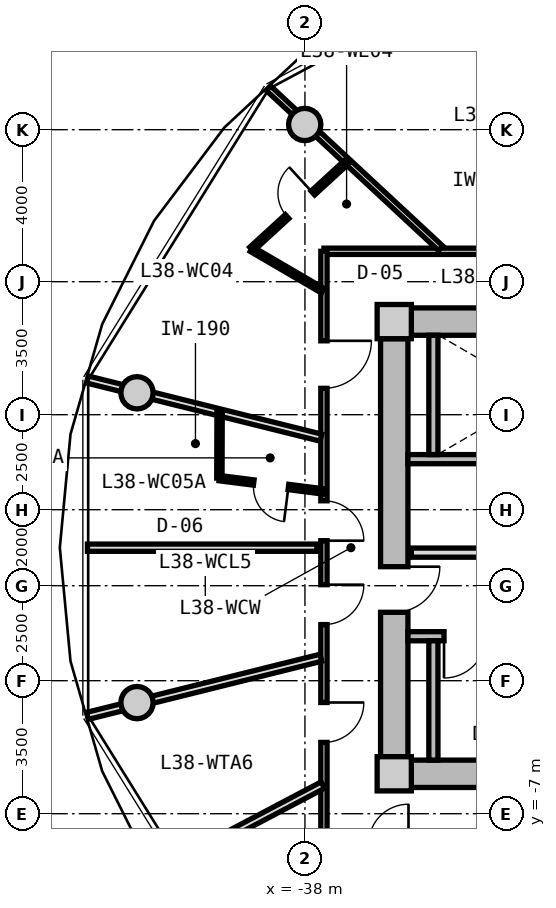
"""IFC4 building model, lengths in metres.
Left out: names, types, materials, properties, quantities, classifications, styles, units other than length and angle.
Written with IfcOpenShell. Run it as: python <this file> out.ifc"""

import sys

from ifc_helpers import new_model, si_unit, direction, frame, frame_2d, origin, origin_2d, place, context, subcontext, project, spatial, rectangle, circle, extrude, source, transform, mapped, element, fill, save


model = new_model("IFC4")
c1 = context("Model", 3, precision=1e-05, world=origin(), true_north=direction((0.0, 1.0)))
c2 = subcontext(c1, "Body", "Model", "MODEL_VIEW")
j1 = project(units=[si_unit("LENGTHUNIT", "METRE"), si_unit("PLANEANGLEUNIT", "RADIAN")], contexts=[c1])
p1 = place(None, origin())
s1 = spatial("IfcSite", under=j1, at=p1, CompositionType="ELEMENT")
p2 = place(p1, origin())
s2 = spatial("IfcBuilding", under=s1, at=p2, CompositionType="ELEMENT")
p3 = place(p2, frame((0.0, 0.0, 123.7)))
s3 = spatial("IfcBuildingStorey", under=s2, at=p3, CompositionType="ELEMENT", Elevation=123.7)
m1 = source(origin(), c2, "Body", "SweptSolid", [
    extrude(rectangle(XDim=0.9, YDim=0.9, at=origin_2d()), origin(), (0.0, 0.0, 1.0), 3.05),
])
for number, where, z_axis, x_axis in (
    (1, (-35.65, -5.95, 0.0), (0.0, 0.0, 1.0), (1.0, 0.0, 0.0)),
    (2, (-35.65, 5.95, 0.0), (0.0, 0.0, 1.0), (1.0, 0.0, 0.0)),
):
    element("IfcColumn", number, at=place(p3, frame(where, z_axis=z_axis, x_axis=x_axis)), inside=s3, PredefinedType="COLUMN", context=c2, shape_type="MappedRepresentation", body=[
        mapped(m1, transform((0.0, 0.0, 0.0), x_axis=(1.0, 0.0, 0.0), y_axis=(0.0, 1.0, 0.0), z_axis=(0.0, 0.0, 1.0), scale=1.0)),
    ])
m2 = source(origin(), c2, "Body", "SweptSolid", [
    extrude(rectangle(XDim=14.4, YDim=0.72, at=frame_2d((7.2, 0.0))), origin(), (0.0, 0.0, 1.0), 2.79),
])
for number, where, z_axis, x_axis in (
    (3, (-35.2, 5.95, 0.0), (0.0, 0.0, 1.0), (1.0, 0.0, 0.0)),
    (4, (-20.8, -5.95, 0.0), (0.0, 0.0, 1.0), (-1.0, 0.0, 0.0)),
):
    element("IfcWall", number, at=place(p3, frame(where, z_axis=z_axis, x_axis=x_axis)), inside=s3, PredefinedType="SHEAR", context=c2, shape_type="MappedRepresentation", body=[
        mapped(m2, transform((0.0, 0.0, 0.0), x_axis=(1.0, 0.0, 0.0), y_axis=(0.0, 1.0, 0.0), z_axis=(0.0, 0.0, 1.0), scale=1.0)),
    ])
m3 = source(origin(), c2, "Body", "SweptSolid", [
    extrude(rectangle(XDim=11.0, YDim=0.72, at=frame_2d((5.5, 0.0))), origin(), (0.0, 0.0, 1.0), 2.79),
])
p4 = place(p3, frame((-35.65, -5.5, 0.0), z_axis=(0.0, 0.0, 1.0), x_axis=(0.0, 1.0, 0.0)))
e5 = element("IfcWall", 5, at=p4, inside=s3, PredefinedType="SHEAR", context=c2, shape_type="MappedRepresentation", body=[
    mapped(m3, transform((0.0, 0.0, 0.0), x_axis=(1.0, 0.0, 0.0), y_axis=(0.0, 1.0, 0.0), z_axis=(0.0, 0.0, 1.0), scale=1.0)),
])
p5 = place(p4, frame((3.8, 0.0, 0.0)))
e6 = element("IfcOpeningElement", 6, at=p5, cuts=e5, PredefinedType="OPENING", context=c2, shape_type="SweptSolid", body=[
    extrude(rectangle(XDim=1.2, YDim=2.15, at=frame_2d((0.6, 1.075))), frame((0.0, 0.37, 0.0), z_axis=(0.0, -1.0, 0.0), x_axis=(1.0, 0.0, 0.0)), (0.0, 0.0, 1.0), 0.74),
])
m4 = source(origin(), c2, "Body", "SweptSolid", [
    extrude(circle(Radius=0.425, at=origin_2d()), origin(), (0.0, 0.0, 1.0), 3.05),
])
for number, where, z_axis, x_axis in (
    (7, (-38.006, 11.137, 0.0), (0.0, 0.0, 1.0), (1.0, 0.0, 0.0)),
    (8, (-42.419, 4.076, 0.0), (0.0, 0.0, 1.0), (1.0, 0.0, 0.0)),
    (9, (-42.419, -4.076, 0.0), (0.0, 0.0, 1.0), (1.0, 0.0, 0.0)),
):
    element("IfcColumn", number, at=place(p3, frame(where, z_axis=z_axis, x_axis=x_axis)), inside=s3, PredefinedType="COLUMN", context=c2, shape_type="MappedRepresentation", body=[
        mapped(m4, transform((0.0, 0.0, 0.0), x_axis=(1.0, 0.0, 0.0), y_axis=(0.0, 1.0, 0.0), z_axis=(0.0, 0.0, 1.0), scale=1.0)),
    ])
m5 = source(origin(), c2, "Body", "SweptSolid", [
    extrude(rectangle(XDim=7.83, YDim=0.24, at=frame_2d((3.915, 0.0))), origin(), (0.0, 0.0, 1.0), 2.79),
])
p6 = place(p3, frame((-35.29, 2.33, 0.0), z_axis=(0.0, 0.0, 1.0), x_axis=(1.0, 0.0, 0.0)))
e10 = element("IfcWall", 10, at=p6, inside=s3, PredefinedType="PARTITIONING", context=c2, shape_type="MappedRepresentation", body=[
    mapped(m5, transform((0.0, 0.0, 0.0), x_axis=(1.0, 0.0, 0.0), y_axis=(0.0, 1.0, 0.0), z_axis=(0.0, 0.0, 1.0), scale=1.0)),
])
m6 = source(origin(), c2, "Body", "SweptSolid", [
    extrude(rectangle(XDim=3.14, YDim=0.24, at=frame_2d((1.57, 0.0))), origin(), (0.0, 0.0, 1.0), 2.79),
])
p7 = place(p3, frame((-34.62, 2.45, 0.0), z_axis=(0.0, 0.0, 1.0), x_axis=(0.0, 1.0, 0.0)))
e11 = element("IfcWall", 11, at=p7, inside=s3, PredefinedType="PARTITIONING", context=c2, shape_type="MappedRepresentation", body=[
    mapped(m6, transform((0.0, 0.0, 0.0), x_axis=(1.0, 0.0, 0.0), y_axis=(0.0, 1.0, 0.0), z_axis=(0.0, 0.0, 1.0), scale=1.0)),
])
p8 = place(p3, frame((-35.29, -2.33, 0.0), z_axis=(0.0, 0.0, 1.0), x_axis=(1.0, 0.0, 0.0)))
e12 = element("IfcWall", 12, at=p8, inside=s3, PredefinedType="PARTITIONING", context=c2, shape_type="MappedRepresentation", body=[
    mapped(m5, transform((0.0, 0.0, 0.0), x_axis=(1.0, 0.0, 0.0), y_axis=(0.0, 1.0, 0.0), z_axis=(0.0, 0.0, 1.0), scale=1.0)),
])
p9 = place(p8, frame((0.95, 0.0, 0.0)))
e13 = element("IfcOpeningElement", 13, at=p9, cuts=e12, PredefinedType="OPENING", context=c2, shape_type="SweptSolid", body=[
    extrude(rectangle(XDim=1.1, YDim=2.15, at=frame_2d((0.55, 1.075))), frame((0.0, 0.13, 0.0), z_axis=(0.0, -1.0, 0.0), x_axis=(1.0, 0.0, 0.0)), (0.0, 0.0, 1.0), 0.26),
])
p10 = place(p3, frame((-34.62, -5.59, 0.0), z_axis=(0.0, 0.0, 1.0), x_axis=(0.0, 1.0, 0.0)))
e14 = element("IfcWall", 14, at=p10, inside=s3, PredefinedType="PARTITIONING", context=c2, shape_type="MappedRepresentation", body=[
    mapped(m6, transform((0.0, 0.0, 0.0), x_axis=(1.0, 0.0, 0.0), y_axis=(0.0, 1.0, 0.0), z_axis=(0.0, 0.0, 1.0), scale=1.0)),
])
m7 = source(origin(), c2, "Body", "SweptSolid", [
    extrude(rectangle(XDim=7.62, YDim=0.24, at=frame_2d((3.81, 0.0))), origin(), (0.0, 0.0, 1.0), 2.775),
])
p11 = place(p3, frame((-35.2, -0.13, 0.0), z_axis=(0.0, 0.0, 1.0), x_axis=(1.0, 0.0, 0.0)))
e15 = element("IfcWall", 15, at=p11, inside=s3, PredefinedType="PARTITIONING", context=c2, shape_type="MappedRepresentation", body=[
    mapped(m7, transform((0.0, 0.0, 0.0), x_axis=(1.0, 0.0, 0.0), y_axis=(0.0, 1.0, 0.0), z_axis=(0.0, 0.0, 1.0), scale=1.0)),
])
p12 = place(p11, frame((6.22, 0.0, 0.0)))
e16 = element("IfcOpeningElement", 16, at=p12, cuts=e15, PredefinedType="OPENING", context=c2, shape_type="SweptSolid", body=[
    extrude(rectangle(XDim=1.0, YDim=2.1, at=frame_2d((0.5, 1.05))), frame((0.0, 0.13, 0.0), z_axis=(0.0, -1.0, 0.0), x_axis=(1.0, 0.0, 0.0)), (0.0, 0.0, 1.0), 0.26),
])
p13 = place(p11, frame((2.4, 0.0, 0.0)))
e17 = element("IfcOpeningElement", 17, at=p13, cuts=e15, PredefinedType="OPENING", context=c2, shape_type="SweptSolid", body=[
    extrude(rectangle(XDim=1.0, YDim=2.1, at=frame_2d((0.5, 1.05))), frame((0.0, 0.13, 0.0), z_axis=(0.0, -1.0, 0.0), x_axis=(1.0, 0.0, 0.0)), (0.0, 0.0, 1.0), 0.26),
])
m8 = source(origin(), c2, "Body", "SweptSolid", [
    extrude(rectangle(XDim=8.6, YDim=0.165, at=frame_2d((4.3, 0.0))), origin(), (0.0, 0.0, 1.0), 2.775),
])
p14 = place(p3, frame((-37.5, 7.8, 0.0), z_axis=(0.0, 0.0, 1.0), x_axis=(1.0, 0.0, 0.0)))
e18 = element("IfcWall", 18, at=p14, inside=s3, PredefinedType="PARTITIONING", context=c2, shape_type="MappedRepresentation", body=[
    mapped(m8, transform((0.0, 0.0, 0.0), x_axis=(1.0, 0.0, 0.0), y_axis=(0.0, 1.0, 0.0), z_axis=(0.0, 0.0, 1.0), scale=1.0)),
])
m9 = source(origin(), c2, "Body", "SweptSolid", [
    extrude(rectangle(XDim=15.6, YDim=0.165, at=frame_2d((7.8, 0.0))), origin(), (0.0, 0.0, 1.0), 2.775),
])
p15 = place(p3, frame((-37.5, -7.8, 0.0), z_axis=(0.0, 0.0, 1.0), x_axis=(0.0, 1.0, 0.0)))
e19 = element("IfcWall", 19, at=p15, inside=s3, PredefinedType="PARTITIONING", context=c2, shape_type="MappedRepresentation", body=[
    mapped(m9, transform((0.0, 0.0, 0.0), x_axis=(1.0, 0.0, 0.0), y_axis=(0.0, 1.0, 0.0), z_axis=(0.0, 0.0, 1.0), scale=1.0)),
])
p16 = place(p15, frame((11.994, 0.0, 0.0)))
e20 = element("IfcOpeningElement", 20, at=p16, cuts=e19, PredefinedType="OPENING", context=c2, shape_type="SweptSolid", body=[
    extrude(rectangle(XDim=1.25, YDim=2.2, at=frame_2d((0.625, 1.1))), frame((0.0, 0.093, 0.0), z_axis=(0.0, -1.0, 0.0), x_axis=(1.0, 0.0, 0.0)), (0.0, 0.0, 1.0), 0.185),
])
p17 = place(p15, frame((7.984, 0.0, 0.0)))
e21 = element("IfcOpeningElement", 21, at=p17, cuts=e19, PredefinedType="OPENING", context=c2, shape_type="SweptSolid", body=[
    extrude(rectangle(XDim=1.05, YDim=2.15, at=frame_2d((0.525, 1.075))), frame((0.0, 0.093, 0.0), z_axis=(0.0, -1.0, 0.0), x_axis=(1.0, 0.0, 0.0)), (0.0, 0.0, 1.0), 0.185),
])
p18 = place(p15, frame((5.777, 0.0, 0.0)))
e22 = element("IfcOpeningElement", 22, at=p18, cuts=e19, PredefinedType="OPENING", context=c2, shape_type="SweptSolid", body=[
    extrude(rectangle(XDim=1.05, YDim=2.15, at=frame_2d((0.525, 1.075))), frame((0.0, 0.093, 0.0), z_axis=(0.0, -1.0, 0.0), x_axis=(1.0, 0.0, 0.0)), (0.0, 0.0, 1.0), 0.185),
])
p19 = place(p15, frame((2.676, 0.0, 0.0)))
e23 = element("IfcOpeningElement", 23, at=p19, cuts=e19, PredefinedType="OPENING", context=c2, shape_type="SweptSolid", body=[
    extrude(rectangle(XDim=1.05, YDim=2.15, at=frame_2d((0.525, 1.075))), frame((0.0, 0.093, 0.0), z_axis=(0.0, -1.0, 0.0), x_axis=(1.0, 0.0, 0.0)), (0.0, 0.0, 1.0), 0.185),
])
m10 = source(origin(), c2, "Body", "SweptSolid", [
    extrude(rectangle(XDim=6.187, YDim=0.165, at=frame_2d((3.093, 0.0))), origin(), (0.0, 0.0, 1.0), 2.275),
])
p20 = place(p3, frame((-34.429, 7.88, 0.0), z_axis=(0.0, 0.0, 1.0), x_axis=(-0.732501077882, 0.680765870841, 0.0)))
e24 = element("IfcWall", 24, at=p20, inside=s3, PredefinedType="PARTITIONING", context=c2, shape_type="MappedRepresentation", body=[
    mapped(m10, transform((0.0, 0.0, 0.0), x_axis=(1.0, 0.0, 0.0), y_axis=(0.0, 1.0, 0.0), z_axis=(0.0, 0.0, 1.0), scale=1.0)),
])
m11 = source(origin(), c2, "Body", "SweptSolid", [
    extrude(rectangle(XDim=6.331, YDim=0.19, at=frame_2d((3.165, 0.0))), origin(), (0.0, 0.0, 1.0), 2.275),
])
p21 = place(p3, frame((-37.58, 2.896, 0.0), z_axis=(0.0, 0.0, 1.0), x_axis=(-0.97036440661, 0.241646267062, 0.0)))
e25 = element("IfcWall", 25, at=p21, inside=s3, PredefinedType="PARTITIONING", context=c2, shape_type="MappedRepresentation", body=[
    mapped(m11, transform((0.0, 0.0, 0.0), x_axis=(1.0, 0.0, 0.0), y_axis=(0.0, 1.0, 0.0), z_axis=(0.0, 0.0, 1.0), scale=1.0)),
])
m12 = source(origin(), c2, "Body", "SweptSolid", [
    extrude(rectangle(XDim=2.172, YDim=0.14, at=frame_2d((1.086, 0.0))), origin(), (0.0, 0.0, 1.0), 2.775),
])
p22 = place(p3, frame((-37.53, 6.762, 0.0), z_axis=(0.0, 0.0, 1.0), x_axis=(-0.863562702562, 0.504241468688, 0.0)))
e26 = element("IfcWall", 26, at=p22, inside=s3, PredefinedType="PARTITIONING", context=c2, shape_type="MappedRepresentation", body=[
    mapped(m12, transform((0.0, 0.0, 0.0), x_axis=(1.0, 0.0, 0.0), y_axis=(0.0, 1.0, 0.0), z_axis=(0.0, 0.0, 1.0), scale=1.0)),
])
m13 = source(origin(), c2, "Body", "SweptSolid", [
    extrude(rectangle(XDim=3.457, YDim=0.14, at=frame_2d((1.729, 0.0))), origin(), (0.0, 0.0, 1.0), 2.775),
])
p23 = place(p3, frame((-39.405, 7.857, 0.0), z_axis=(0.0, 0.0, 1.0), x_axis=(0.737567375492, 0.675273549467, 0.0)))
e27 = element("IfcWall", 27, at=p23, inside=s3, PredefinedType="PARTITIONING", context=c2, shape_type="MappedRepresentation", body=[
    mapped(m13, transform((0.0, 0.0, 0.0), x_axis=(1.0, 0.0, 0.0), y_axis=(0.0, 1.0, 0.0), z_axis=(0.0, 0.0, 1.0), scale=1.0)),
])
p24 = place(p23, frame((1.268, 0.0, 0.0)))
e28 = element("IfcOpeningElement", 28, at=p24, cuts=e27, PredefinedType="OPENING", context=c2, shape_type="SweptSolid", body=[
    extrude(rectangle(XDim=0.92, YDim=2.1, at=frame_2d((0.46, 1.05))), frame((0.0, 0.08, 0.0), z_axis=(0.0, -1.0, 0.0), x_axis=(1.0, 0.0, 0.0)), (0.0, 0.0, 1.0), 0.16),
])
p25 = place(p3, frame((-37.58, -2.896, 0.0), z_axis=(0.0, 0.0, 1.0), x_axis=(-0.97036440661, -0.241646267062, 0.0)))
e29 = element("IfcWall", 29, at=p25, inside=s3, PredefinedType="PARTITIONING", context=c2, shape_type="MappedRepresentation", body=[
    mapped(m11, transform((0.0, 0.0, 0.0), x_axis=(1.0, 0.0, 0.0), y_axis=(0.0, 1.0, 0.0), z_axis=(0.0, 0.0, 1.0), scale=1.0)),
])
m14 = source(origin(), c2, "Body", "SweptSolid", [
    extrude(rectangle(XDim=6.039, YDim=0.19, at=frame_2d((3.019, 0.0))), origin(), (0.0, 0.0, 1.0), 2.775),
])
p26 = place(p3, frame((-37.685, 0.0, 0.0), z_axis=(0.0, 0.0, 1.0), x_axis=(-1.0, 0.0, 0.0)))
e30 = element("IfcWall", 30, at=p26, inside=s3, PredefinedType="PARTITIONING", context=c2, shape_type="MappedRepresentation", body=[
    mapped(m14, transform((0.0, 0.0, 0.0), x_axis=(1.0, 0.0, 0.0), y_axis=(0.0, 1.0, 0.0), z_axis=(0.0, 0.0, 1.0), scale=1.0)),
])
m15 = source(origin(), c2, "Body", "SweptSolid", [
    extrude(rectangle(XDim=2.744, YDim=0.14, at=frame_2d((1.372, 0.0))), origin(), (0.0, 0.0, 1.0), 2.775),
])
p27 = place(p3, frame((-37.53, 1.482, 0.0), z_axis=(0.0, 0.0, 1.0), x_axis=(-0.991916450239, 0.126892693823, 0.0)))
e31 = element("IfcWall", 31, at=p27, inside=s3, PredefinedType="PARTITIONING", context=c2, shape_type="MappedRepresentation", body=[
    mapped(m15, transform((0.0, 0.0, 0.0), x_axis=(1.0, 0.0, 0.0), y_axis=(0.0, 1.0, 0.0), z_axis=(0.0, 0.0, 1.0), scale=1.0)),
])
p28 = place(p27, frame((0.912, 0.0, 0.0)))
e32 = element("IfcOpeningElement", 32, at=p28, cuts=e31, PredefinedType="OPENING", context=c2, shape_type="SweptSolid", body=[
    extrude(rectangle(XDim=0.92, YDim=2.1, at=frame_2d((0.46, 1.05))), frame((0.0, 0.08, 0.0), z_axis=(0.0, -1.0, 0.0), x_axis=(1.0, 0.0, 0.0)), (0.0, 0.0, 1.0), 0.16),
])
m16 = source(origin(), c2, "Body", "SweptSolid", [
    extrude(rectangle(XDim=1.749, YDim=0.14, at=frame_2d((0.875, 0.0))), origin(), (0.0, 0.0, 1.0), 2.775),
])
p29 = place(p3, frame((-40.251, 1.831, 0.0), z_axis=(0.0, 0.0, 1.0), x_axis=(0.003350064953, 0.999994388517, 0.0)))
e33 = element("IfcWall", 33, at=p29, inside=s3, PredefinedType="PARTITIONING", context=c2, shape_type="MappedRepresentation", body=[
    mapped(m16, transform((0.0, 0.0, 0.0), x_axis=(1.0, 0.0, 0.0), y_axis=(0.0, 1.0, 0.0), z_axis=(0.0, 0.0, 1.0), scale=1.0)),
])
m17 = source(origin(), c2, "Body", "SweptSolid", [
    extrude(rectangle(XDim=4.31, YDim=0.19, at=frame_2d((2.155, 0.0))), origin(), (0.0, 0.0, 1.0), 2.775),
])
p30 = place(p3, frame((-37.53, -6.248, 0.0), z_axis=(0.0, 0.0, 1.0), x_axis=(-0.884459441503, -0.466617076773, 0.0)))
e34 = element("IfcWall", 34, at=p30, inside=s3, PredefinedType="PARTITIONING", context=c2, shape_type="MappedRepresentation", body=[
    mapped(m17, transform((0.0, 0.0, 0.0), x_axis=(1.0, 0.0, 0.0), y_axis=(0.0, 1.0, 0.0), z_axis=(0.0, 0.0, 1.0), scale=1.0)),
])
m18 = source(origin(), c2, "Body", "SweptSolid", [
    extrude(rectangle(XDim=1.1, YDim=2.15, at=frame_2d((0.55, 1.075))), frame((0.0, 0.025, 0.0), z_axis=(0.0, -1.0, 0.0), x_axis=(1.0, 0.0, 0.0)), (0.0, 0.0, 1.0), 0.05),
])
p31 = place(p9, frame((1.1, 0.0, 0.0), z_axis=(0.0, 0.0, 1.0), x_axis=(-1.0, 0.0, 0.0)))
e35 = element("IfcDoor", 35, at=p31, inside=s3, OperationType="SINGLE_SWING_RIGHT", PredefinedType="DOOR", context=c2, shape_type="MappedRepresentation", body=[
    mapped(m18, transform((0.0, 0.0, 0.0), x_axis=(1.0, 0.0, 0.0), y_axis=(0.0, 1.0, 0.0), z_axis=(0.0, 0.0, 1.0), scale=1.0)),
])
fill(e13, e35)
m19 = source(origin(), c2, "Body", "SweptSolid", [
    extrude(rectangle(XDim=1.2, YDim=2.15, at=frame_2d((0.6, 1.075))), frame((0.0, 0.025, 0.0), z_axis=(0.0, -1.0, 0.0), x_axis=(1.0, 0.0, 0.0)), (0.0, 0.0, 1.0), 0.05),
])
p32 = place(p5, frame((1.2, 0.0, 0.0), z_axis=(0.0, 0.0, 1.0), x_axis=(-1.0, 0.0, 0.0)))
e36 = element("IfcDoor", 36, at=p32, inside=s3, OperationType="SINGLE_SWING_LEFT", PredefinedType="DOOR", context=c2, shape_type="MappedRepresentation", body=[
    mapped(m19, transform((0.0, 0.0, 0.0), x_axis=(1.0, 0.0, 0.0), y_axis=(0.0, 1.0, 0.0), z_axis=(0.0, 0.0, 1.0), scale=1.0)),
])
fill(e6, e36)
m20 = source(origin(), c2, "Body", "SweptSolid", [
    extrude(rectangle(XDim=1.25, YDim=2.2, at=frame_2d((0.625, 1.1))), frame((0.0, 0.025, 0.0), z_axis=(0.0, -1.0, 0.0), x_axis=(1.0, 0.0, 0.0)), (0.0, 0.0, 1.0), 0.05),
])
p33 = place(p16, frame((1.25, 0.0, 0.0), z_axis=(0.0, 0.0, 1.0), x_axis=(-1.0, 0.0, 0.0)))
e37 = element("IfcDoor", 37, at=p33, inside=s3, OperationType="SINGLE_SWING_LEFT", PredefinedType="DOOR", context=c2, shape_type="MappedRepresentation", body=[
    mapped(m20, transform((0.0, 0.0, 0.0), x_axis=(1.0, 0.0, 0.0), y_axis=(0.0, 1.0, 0.0), z_axis=(0.0, 0.0, 1.0), scale=1.0)),
])
fill(e20, e37)
m21 = source(origin(), c2, "Body", "SweptSolid", [
    extrude(rectangle(XDim=0.92, YDim=2.1, at=frame_2d((0.46, 1.05))), frame((0.0, 0.025, 0.0), z_axis=(0.0, -1.0, 0.0), x_axis=(1.0, 0.0, 0.0)), (0.0, 0.0, 1.0), 0.05),
])
p34 = place(p24, origin())
e38 = element("IfcDoor", 38, at=p34, inside=s3, OperationType="SINGLE_SWING_RIGHT", PredefinedType="DOOR", context=c2, shape_type="MappedRepresentation", body=[
    mapped(m21, transform((0.0, 0.0, 0.0), x_axis=(1.0, 0.0, 0.0), y_axis=(0.0, 1.0, 0.0), z_axis=(0.0, 0.0, 1.0), scale=1.0)),
])
fill(e28, e38)
m22 = source(origin(), c2, "Body", "SweptSolid", [
    extrude(rectangle(XDim=1.05, YDim=2.15, at=frame_2d((0.525, 1.075))), frame((0.0, 0.025, 0.0), z_axis=(0.0, -1.0, 0.0), x_axis=(1.0, 0.0, 0.0)), (0.0, 0.0, 1.0), 0.05),
])
p35 = place(p17, frame((1.05, 0.0, 0.0), z_axis=(0.0, 0.0, 1.0), x_axis=(-1.0, 0.0, 0.0)))
e39 = element("IfcDoor", 39, at=p35, inside=s3, OperationType="SINGLE_SWING_RIGHT", PredefinedType="DOOR", context=c2, shape_type="MappedRepresentation", body=[
    mapped(m22, transform((0.0, 0.0, 0.0), x_axis=(1.0, 0.0, 0.0), y_axis=(0.0, 1.0, 0.0), z_axis=(0.0, 0.0, 1.0), scale=1.0)),
])
fill(e21, e39)
p36 = place(p28, origin())
e40 = element("IfcDoor", 40, at=p36, inside=s3, OperationType="SINGLE_SWING_LEFT", PredefinedType="DOOR", context=c2, shape_type="MappedRepresentation", body=[
    mapped(m21, transform((0.0, 0.0, 0.0), x_axis=(1.0, 0.0, 0.0), y_axis=(0.0, 1.0, 0.0), z_axis=(0.0, 0.0, 1.0), scale=1.0)),
])
fill(e32, e40)
p37 = place(p18, frame((1.05, 0.0, 0.0), z_axis=(0.0, 0.0, 1.0), x_axis=(-1.0, 0.0, 0.0)))
e41 = element("IfcDoor", 41, at=p37, inside=s3, OperationType="SINGLE_SWING_LEFT", PredefinedType="DOOR", context=c2, shape_type="MappedRepresentation", body=[
    mapped(m22, transform((0.0, 0.0, 0.0), x_axis=(1.0, 0.0, 0.0), y_axis=(0.0, 1.0, 0.0), z_axis=(0.0, 0.0, 1.0), scale=1.0)),
])
fill(e22, e41)
p38 = place(p19, frame((1.05, 0.0, 0.0), z_axis=(0.0, 0.0, 1.0), x_axis=(-1.0, 0.0, 0.0)))
e42 = element("IfcDoor", 42, at=p38, inside=s3, OperationType="SINGLE_SWING_LEFT", PredefinedType="DOOR", context=c2, shape_type="MappedRepresentation", body=[
    mapped(m22, transform((0.0, 0.0, 0.0), x_axis=(1.0, 0.0, 0.0), y_axis=(0.0, 1.0, 0.0), z_axis=(0.0, 0.0, 1.0), scale=1.0)),
])
fill(e23, e42)
save(model, sys.argv[1])
